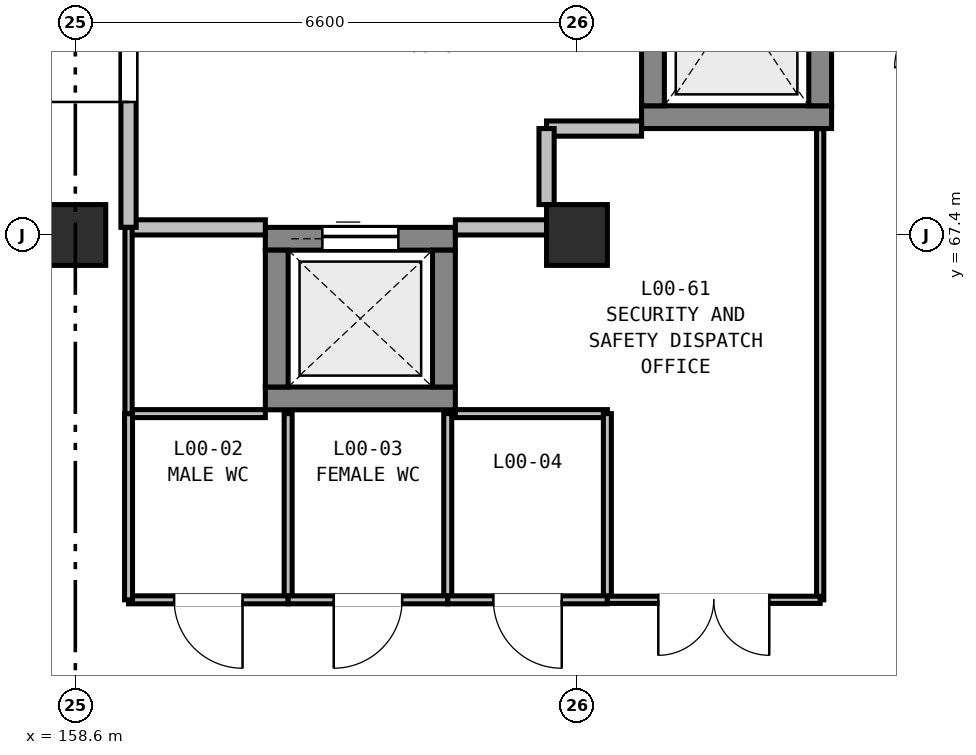
"""IFC4 building model, lengths in metres.
Left out: names, types, materials, properties, quantities, classifications, styles, units other than length and angle.
Written with IfcOpenShell. Run it as: python <this file> out.ifc"""

import sys

from ifc_helpers import new_model, si_unit, direction, frame, frame_2d, origin, origin_2d, place, context, subcontext, project, spatial, rectangle, extrude, element, fill, save


model = new_model("IFC4")
c1 = context("Model", 3, precision=1e-05, world=origin(), true_north=direction((0.0, 1.0)))
c2 = subcontext(c1, "Body", "Model", "MODEL_VIEW")
j1 = project(units=[si_unit("LENGTHUNIT", "METRE"), si_unit("PLANEANGLEUNIT", "RADIAN")], contexts=[c1])
p1 = place(None, origin())
s1 = spatial("IfcSite", under=j1, at=p1, CompositionType="ELEMENT")
p2 = place(p1, origin())
s2 = spatial("IfcBuilding", under=s1, at=p2, CompositionType="ELEMENT")
p3 = place(p2, origin())
s3 = spatial("IfcBuildingStorey", under=s2, at=p3, CompositionType="ELEMENT", Elevation=0.0)
for number, where, z_axis, x_axis in (
    (1, (158.6, 67.4, 0.0), (0.0, 0.0, 1.0), (1.0, 0.0, 0.0)),
    (2, (165.2, 67.4, 0.0), (0.0, 0.0, 1.0), (1.0, 0.0, 0.0)),
):
    element("IfcColumn", number, at=place(p3, frame(where, z_axis=z_axis, x_axis=x_axis)), inside=s3, PredefinedType="COLUMN", context=c2, shape_type="SweptSolid", body=[
        extrude(rectangle(XDim=0.8, YDim=0.8, at=origin_2d()), origin(), (0.0, 0.0, 1.0), 5.4),
    ])
p4 = place(p3, frame((166.05, 68.95, 0.0), z_axis=(0.0, 0.0, 1.0), x_axis=(1.0, 0.0, 0.0)))
e3 = element("IfcWall", 3, at=p4, inside=s3, PredefinedType="SHEAR", context=c2, shape_type="SweptSolid", body=[
    extrude(rectangle(XDim=2.5, YDim=0.3, at=frame_2d((1.25, 0.0))), origin(), (0.0, 0.0, 1.0), 5.4),
])
p5 = place(p3, frame((166.2, 69.1, 0.0), z_axis=(0.0, 0.0, 1.0), x_axis=(0.0, 1.0, 0.0)))
e4 = element("IfcWall", 4, at=p5, inside=s3, PredefinedType="SHEAR", context=c2, shape_type="SweptSolid", body=[
    extrude(rectangle(XDim=2.7, YDim=0.3, at=frame_2d((1.35, 0.0))), origin(), (0.0, 0.0, 1.0), 5.4),
])
p6 = place(p5, frame((0.8, 0.0, 0.0)))
e5 = element("IfcOpeningElement", 5, at=p6, cuts=e4, PredefinedType="OPENING", context=c2, shape_type="SweptSolid", body=[
    extrude(rectangle(XDim=1.1, YDim=2.1, at=frame_2d((0.55, 1.05))), frame((0.0, 0.16, 0.0), z_axis=(0.0, -1.0, 0.0), x_axis=(1.0, 0.0, 0.0)), (0.0, 0.0, 1.0), 0.32),
])
p7 = place(p3, frame((168.4, 69.1, 0.0), z_axis=(0.0, 0.0, 1.0), x_axis=(0.0, 1.0, 0.0)))
e6 = element("IfcWall", 6, at=p7, inside=s3, PredefinedType="SHEAR", context=c2, shape_type="SweptSolid", body=[
    extrude(rectangle(XDim=2.7, YDim=0.3, at=frame_2d((1.35, 0.0))), origin(), (0.0, 0.0, 1.0), 5.4),
])
p8 = place(p3, frame((161.1, 65.25, 0.0), z_axis=(0.0, 0.0, 1.0), x_axis=(1.0, 0.0, 0.0)))
e7 = element("IfcWall", 7, at=p8, inside=s3, PredefinedType="SHEAR", context=c2, shape_type="SweptSolid", body=[
    extrude(rectangle(XDim=2.5, YDim=0.3, at=frame_2d((1.25, 0.0))), origin(), (0.0, 0.0, 1.0), 5.4),
])
p9 = place(p3, frame((161.1, 67.35, 0.0), z_axis=(0.0, 0.0, 1.0), x_axis=(1.0, 0.0, 0.0)))
e8 = element("IfcWall", 8, at=p9, inside=s3, PredefinedType="SHEAR", context=c2, shape_type="SweptSolid", body=[
    extrude(rectangle(XDim=2.5, YDim=0.3, at=frame_2d((1.25, 0.0))), origin(), (0.0, 0.0, 1.0), 5.4),
])
p10 = place(p9, frame((0.75, 0.0, 0.0)))
e9 = element("IfcOpeningElement", 9, at=p10, cuts=e8, PredefinedType="OPENING", context=c2, shape_type="SweptSolid", body=[
    extrude(rectangle(XDim=1.0, YDim=2.1, at=frame_2d((0.5, 1.05))), frame((0.0, 0.16, 0.0), z_axis=(0.0, -1.0, 0.0), x_axis=(1.0, 0.0, 0.0)), (0.0, 0.0, 1.0), 0.32),
])
for number, where, z_axis, x_axis in (
    (10, (161.25, 65.4, 0.0), (0.0, 0.0, 1.0), (0.0, 1.0, 0.0)),
    (11, (163.45, 65.4, 0.0), (0.0, 0.0, 1.0), (0.0, 1.0, 0.0)),
):
    element("IfcWall", number, at=place(p3, frame(where, z_axis=z_axis, x_axis=x_axis)), inside=s3, PredefinedType="SHEAR", context=c2, shape_type="SweptSolid", body=[
        extrude(rectangle(XDim=1.8, YDim=0.3, at=frame_2d((0.9, 0.0))), origin(), (0.0, 0.0, 1.0), 5.4),
    ])
p11 = place(p3, frame((166.05, 68.8, 0.0), z_axis=(0.0, 0.0, 1.0), x_axis=(-1.0, 0.0, 0.0)))
e12 = element("IfcWall", 12, at=p11, inside=s3, PredefinedType="PARTITIONING", context=c2, shape_type="SweptSolid", body=[
    extrude(rectangle(XDim=1.25, YDim=0.2, at=frame_2d((0.625, 0.0))), origin(), (0.0, 0.0, 1.0), 4.535),
])
p12 = place(p3, frame((164.8, 68.8, 0.0), z_axis=(0.0, 0.0, 1.0), x_axis=(0.0, -1.0, 0.0)))
e13 = element("IfcWall", 13, at=p12, inside=s3, PredefinedType="PARTITIONING", context=c2, shape_type="SweptSolid", body=[
    extrude(rectangle(XDim=1.0, YDim=0.2, at=frame_2d((0.5, 0.0))), origin(), (0.0, 0.0, 1.0), 5.095),
])
p13 = place(p3, frame((164.8, 67.5, 0.0), z_axis=(0.0, 0.0, 1.0), x_axis=(-1.0, 0.0, 0.0)))
e14 = element("IfcWall", 14, at=p13, inside=s3, PredefinedType="PARTITIONING", context=c2, shape_type="SweptSolid", body=[
    extrude(rectangle(XDim=1.2, YDim=0.2, at=frame_2d((0.6, 0.0))), origin(), (0.0, 0.0, 1.0), 4.735),
])
p14 = place(p3, frame((161.1, 67.5, 0.0), z_axis=(0.0, 0.0, 1.0), x_axis=(-1.0, 0.0, 0.0)))
e15 = element("IfcWall", 15, at=p14, inside=s3, PredefinedType="PARTITIONING", context=c2, shape_type="SweptSolid", body=[
    extrude(rectangle(XDim=1.8, YDim=0.2, at=frame_2d((0.9, 0.0))), origin(), (0.0, 0.0, 1.0), 4.735),
])
p15 = place(p3, frame((159.3, 67.5, 0.0), z_axis=(0.0, 0.0, 1.0), x_axis=(0.0, 1.0, 0.0)))
e16 = element("IfcWall", 16, at=p15, inside=s3, PredefinedType="PARTITIONING", context=c2, shape_type="SweptSolid", body=[
    extrude(rectangle(XDim=4.55, YDim=0.2, at=frame_2d((2.275, 0.0))), origin(), (0.0, 0.0, 1.0), 4.735),
])
p16 = place(p15, frame((1.65, 0.0, 0.0)))
e17 = element("IfcOpeningElement", 17, at=p16, cuts=e16, PredefinedType="OPENING", context=c2, shape_type="SweptSolid", body=[
    extrude(rectangle(XDim=1.25, YDim=2.15, at=frame_2d((0.625, 1.075))), frame((0.0, 0.11, 0.0), z_axis=(0.0, -1.0, 0.0), x_axis=(1.0, 0.0, 0.0)), (0.0, 0.0, 1.0), 0.22),
])
p17 = place(p3, frame((159.3, 65.05, 0.0), z_axis=(0.0, 0.0, 1.0), x_axis=(1.0, 0.0, 0.0)))
e18 = element("IfcWall", 18, at=p17, inside=s3, PredefinedType="PARTITIONING", context=c2, shape_type="SweptSolid", body=[
    extrude(rectangle(XDim=1.8, YDim=0.105, at=frame_2d((0.9, 0.0))), origin(), (0.0, 0.0, 1.0), 5.095),
])
p18 = place(p3, frame((161.4, 65.05, 0.0), z_axis=(0.0, 0.0, 1.0), x_axis=(0.0, -1.0, 0.0)))
e19 = element("IfcWall", 19, at=p18, inside=s3, PredefinedType="PARTITIONING", context=c2, shape_type="SweptSolid", body=[
    extrude(rectangle(XDim=2.45, YDim=0.105, at=frame_2d((1.225, 0.0))), origin(), (0.0, 0.0, 1.0), 5.095),
])
p19 = place(p3, frame((161.4, 62.6, 0.0), z_axis=(0.0, 0.0, 1.0), x_axis=(-1.0, 0.0, 0.0)))
e20 = element("IfcWall", 20, at=p19, inside=s3, PredefinedType="PARTITIONING", context=c2, shape_type="SweptSolid", body=[
    extrude(rectangle(XDim=2.1, YDim=0.105, at=frame_2d((1.05, 0.0))), origin(), (0.0, 0.0, 1.0), 5.095),
])
p20 = place(p19, frame((0.6, 0.0, 0.0)))
e21 = element("IfcOpeningElement", 21, at=p20, cuts=e20, PredefinedType="OPENING", context=c2, shape_type="SweptSolid", body=[
    extrude(rectangle(XDim=0.9, YDim=2.02, at=frame_2d((0.45, 1.01))), frame((0.0, 0.062, 0.0), z_axis=(0.0, -1.0, 0.0), x_axis=(1.0, 0.0, 0.0)), (0.0, 0.0, 1.0), 0.125),
])
for number, where, z_axis, x_axis in (
    (22, (159.3, 62.6, 0.0), (0.0, 0.0, 1.0), (0.0, 1.0, 0.0)),
    (23, (163.5, 65.05, 0.0), (0.0, 0.0, 1.0), (0.0, -1.0, 0.0)),
):
    element("IfcWall", number, at=place(p3, frame(where, z_axis=z_axis, x_axis=x_axis)), inside=s3, PredefinedType="PARTITIONING", context=c2, shape_type="SweptSolid", body=[
        extrude(rectangle(XDim=2.45, YDim=0.105, at=frame_2d((1.225, 0.0))), origin(), (0.0, 0.0, 1.0), 5.095),
    ])
p21 = place(p3, frame((163.5, 62.6, 0.0), z_axis=(0.0, 0.0, 1.0), x_axis=(-1.0, 0.0, 0.0)))
e24 = element("IfcWall", 24, at=p21, inside=s3, PredefinedType="PARTITIONING", context=c2, shape_type="SweptSolid", body=[
    extrude(rectangle(XDim=2.1, YDim=0.105, at=frame_2d((1.05, 0.0))), origin(), (0.0, 0.0, 1.0), 5.095),
])
p22 = place(p21, frame((0.6, 0.0, 0.0)))
e25 = element("IfcOpeningElement", 25, at=p22, cuts=e24, PredefinedType="OPENING", context=c2, shape_type="SweptSolid", body=[
    extrude(rectangle(XDim=0.9, YDim=2.02, at=frame_2d((0.45, 1.01))), frame((0.0, 0.062, 0.0), z_axis=(0.0, -1.0, 0.0), x_axis=(1.0, 0.0, 0.0)), (0.0, 0.0, 1.0), 0.125),
])
p23 = place(p3, frame((163.6, 65.05, 0.0), z_axis=(0.0, 0.0, 1.0), x_axis=(1.0, 0.0, 0.0)))
e26 = element("IfcWall", 26, at=p23, inside=s3, PredefinedType="PARTITIONING", context=c2, shape_type="SweptSolid", body=[
    extrude(rectangle(XDim=2.0, YDim=0.105, at=frame_2d((1.0, 0.0))), origin(), (0.0, 0.0, 1.0), 4.535),
])
p24 = place(p3, frame((165.6, 65.05, 0.0), z_axis=(0.0, 0.0, 1.0), x_axis=(0.0, -1.0, 0.0)))
e27 = element("IfcWall", 27, at=p24, inside=s3, PredefinedType="PARTITIONING", context=c2, shape_type="SweptSolid", body=[
    extrude(rectangle(XDim=2.45, YDim=0.105, at=frame_2d((1.225, 0.0))), origin(), (0.0, 0.0, 1.0), 5.095),
])
p25 = place(p3, frame((165.6, 62.6, 0.0), z_axis=(0.0, 0.0, 1.0), x_axis=(-1.0, 0.0, 0.0)))
e28 = element("IfcWall", 28, at=p25, inside=s3, PredefinedType="PARTITIONING", context=c2, shape_type="SweptSolid", body=[
    extrude(rectangle(XDim=2.1, YDim=0.105, at=frame_2d((1.05, 0.0))), origin(), (0.0, 0.0, 1.0), 4.535),
])
p26 = place(p25, frame((0.6, 0.0, 0.0)))
e29 = element("IfcOpeningElement", 29, at=p26, cuts=e28, PredefinedType="OPENING", context=c2, shape_type="SweptSolid", body=[
    extrude(rectangle(XDim=0.9, YDim=2.02, at=frame_2d((0.45, 1.01))), frame((0.0, 0.062, 0.0), z_axis=(0.0, -1.0, 0.0), x_axis=(1.0, 0.0, 0.0)), (0.0, 0.0, 1.0), 0.125),
])
p27 = place(p3, frame((168.4, 68.798, 0.0), z_axis=(0.0, 0.0, 1.0), x_axis=(0.0, -1.0, 0.0)))
e30 = element("IfcWall", 30, at=p27, inside=s3, PredefinedType="PARTITIONING", context=c2, shape_type="SweptSolid", body=[
    extrude(rectangle(XDim=6.198, YDim=0.095, at=frame_2d((3.099, 0.0))), origin(), (0.0, 0.0, 1.0), 4.735),
])
p28 = place(p3, frame((168.4, 62.6, 0.0), z_axis=(0.0, 0.0, 1.0), x_axis=(-1.0, 0.0, 0.0)))
e31 = element("IfcWall", 31, at=p28, inside=s3, PredefinedType="PARTITIONING", context=c2, shape_type="SweptSolid", body=[
    extrude(rectangle(XDim=2.8, YDim=0.095, at=frame_2d((1.4, 0.0))), origin(), (0.0, 0.0, 1.0), 4.885),
])
p29 = place(p28, frame((0.67, 0.0, 0.0)))
e32 = element("IfcOpeningElement", 32, at=p29, cuts=e31, PredefinedType="OPENING", context=c2, shape_type="SweptSolid", body=[
    extrude(rectangle(XDim=1.46, YDim=2.2, at=frame_2d((0.73, 1.1))), frame((0.0, 0.057, 0.0), z_axis=(0.0, -1.0, 0.0), x_axis=(1.0, 0.0, 0.0)), (0.0, 0.0, 1.0), 0.115),
])
p30 = place(p3, frame((159.3, 65.05, 0.0), z_axis=(0.0, 0.0, 1.0), x_axis=(0.0, 1.0, 0.0)))
e33 = element("IfcWall", 33, at=p30, inside=s3, PredefinedType="PARTITIONING", context=c2, shape_type="SweptSolid", body=[
    extrude(rectangle(XDim=2.45, YDim=0.095, at=frame_2d((1.225, 0.0))), origin(), (0.0, 0.0, 1.0), 4.735),
])
p31 = place(p10, origin())
e34 = element("IfcDoor", 34, at=p31, inside=s3, OperationType="SLIDING_TO_LEFT", PredefinedType="DOOR", context=c2, shape_type="SweptSolid", body=[
    extrude(rectangle(XDim=1.0, YDim=2.1, at=frame_2d((0.5, 1.05))), frame((0.0, 0.025, 0.0), z_axis=(0.0, -1.0, 0.0), x_axis=(1.0, 0.0, 0.0)), (0.0, 0.0, 1.0), 0.05),
])
fill(e9, e34)
p32 = place(p16, origin())
e35 = element("IfcDoor", 35, at=p32, inside=s3, OperationType="SINGLE_SWING_LEFT", PredefinedType="DOOR", context=c2, shape_type="SweptSolid", body=[
    extrude(rectangle(XDim=1.25, YDim=2.15, at=frame_2d((0.625, 1.075))), frame((0.0, 0.025, 0.0), z_axis=(0.0, -1.0, 0.0), x_axis=(1.0, 0.0, 0.0)), (0.0, 0.0, 1.0), 0.05),
])
fill(e17, e35)
p33 = place(p20, origin())
e36 = element("IfcDoor", 36, at=p33, inside=s3, OperationType="SINGLE_SWING_LEFT", PredefinedType="DOOR", context=c2, shape_type="SweptSolid", body=[
    extrude(rectangle(XDim=0.9, YDim=2.02, at=frame_2d((0.45, 1.01))), frame((0.0, 0.025, 0.0), z_axis=(0.0, -1.0, 0.0), x_axis=(1.0, 0.0, 0.0)), (0.0, 0.0, 1.0), 0.05),
])
fill(e21, e36)
p34 = place(p22, origin())
e37 = element("IfcDoor", 37, at=p34, inside=s3, OperationType="SINGLE_SWING_RIGHT", PredefinedType="DOOR", context=c2, shape_type="SweptSolid", body=[
    extrude(rectangle(XDim=0.9, YDim=2.02, at=frame_2d((0.45, 1.01))), frame((0.0, 0.025, 0.0), z_axis=(0.0, -1.0, 0.0), x_axis=(1.0, 0.0, 0.0)), (0.0, 0.0, 1.0), 0.05),
])
fill(e25, e37)
p35 = place(p26, origin())
e38 = element("IfcDoor", 38, at=p35, inside=s3, OperationType="SINGLE_SWING_LEFT", PredefinedType="DOOR", context=c2, shape_type="SweptSolid", body=[
    extrude(rectangle(XDim=0.9, YDim=2.02, at=frame_2d((0.45, 1.01))), frame((0.0, 0.025, 0.0), z_axis=(0.0, -1.0, 0.0), x_axis=(1.0, 0.0, 0.0)), (0.0, 0.0, 1.0), 0.05),
])
fill(e29, e38)
p36 = place(p29, origin())
e39 = element("IfcDoor", 39, at=p36, inside=s3, OperationType="DOUBLE_DOOR_SINGLE_SWING", PredefinedType="DOOR", context=c2, shape_type="SweptSolid", body=[
    extrude(rectangle(XDim=1.46, YDim=2.2, at=frame_2d((0.73, 1.1))), frame((0.0, 0.025, 0.0), z_axis=(0.0, -1.0, 0.0), x_axis=(1.0, 0.0, 0.0)), (0.0, 0.0, 1.0), 0.05),
])
fill(e32, e39)
save(model, sys.argv[1])
